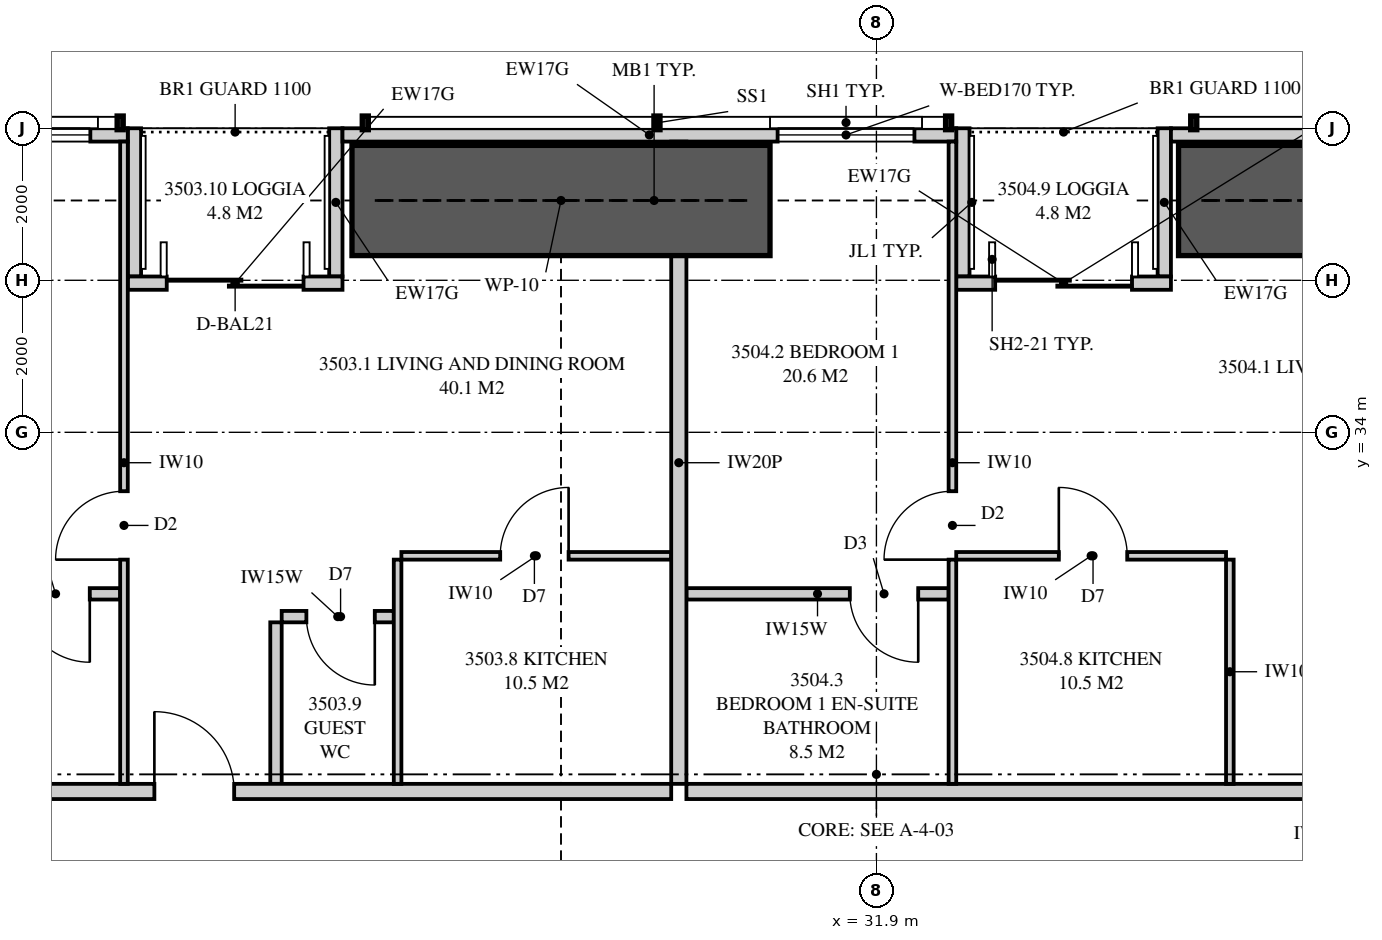
"""IFC4 building model, lengths in metres.
Left out: names, types, materials, properties, quantities, classifications, styles, units other than length and angle.
Written with IfcOpenShell. Run it as: python <this file> out.ifc"""

import sys

from ifc_helpers import new_model, si_unit, direction, frame, frame_2d, origin, place, context, subcontext, project, spatial, polyline, rectangle, outline, extrude, element, fill, save


model = new_model("IFC4")
c1 = context("Model", 3, precision=1e-05, world=origin(), true_north=direction((0.0, 1.0)))
c2 = subcontext(c1, "Body", "Model", "MODEL_VIEW")
j1 = project(units=[si_unit("LENGTHUNIT", "METRE"), si_unit("PLANEANGLEUNIT", "RADIAN")], contexts=[c1])
p1 = place(None, origin())
s1 = spatial("IfcSite", under=j1, at=p1, CompositionType="ELEMENT")
p2 = place(p1, origin())
s2 = spatial("IfcBuilding", under=s1, at=p2, CompositionType="ELEMENT")
p3 = place(p2, frame((0.0, 0.0, 128.3)))
s3 = spatial("IfcBuildingStorey", under=s2, at=p3, CompositionType="ELEMENT", Elevation=128.3)
p4 = place(p3, frame((46.449, 37.913, 0.0), z_axis=(0.0, 0.0, 1.0), x_axis=(-1.0, 0.0, 0.0)))
e1 = element("IfcWall", 1, at=p4, inside=s3, PredefinedType="SOLIDWALL", context=c2, shape_type="SweptSolid", body=[
    extrude(outline(polyline([(0.0, 0.0), (10.674, 0.0), (10.674, 2.15), (7.824, 2.15), (7.824, 3.11), (7.666, 3.11), (7.666, 2.15), (7.62, 2.15), (7.62, 3.11), (0.0, 3.11), (0.0, 0.0)])), frame((0.0, 0.087, 0.0), z_axis=(0.0, -1.0, 0.0), x_axis=(1.0, 0.0, 0.0)), (0.0, 0.0, 1.0), 0.175),
])
p5 = place(p4, frame((2.399, 0.0, 0.4)))
e2 = element("IfcOpeningElement", 2, at=p5, cuts=e1, PredefinedType="OPENING", context=c2, shape_type="SweptSolid", body=[
    extrude(rectangle(XDim=1.8, YDim=1.7, at=frame_2d((0.9, 0.85))), frame((0.0, 0.097, 0.0), z_axis=(0.0, -1.0, 0.0), x_axis=(1.0, 0.0, 0.0)), (0.0, 0.0, 1.0), 0.195),
])
p6 = place(p3, frame((32.95, 37.913, 0.0), z_axis=(0.0, 0.0, 1.0), x_axis=(-1.0, 0.0, 0.0)))
e3 = element("IfcWall", 3, at=p6, inside=s3, PredefinedType="SOLIDWALL", context=c2, shape_type="SweptSolid", body=[
    extrude(rectangle(XDim=8.075, YDim=0.175, at=frame_2d((4.038, 0.0))), origin(), (0.0, 0.0, 1.0), 2.15),
])
p7 = place(p6, frame((0.55, 0.0, 0.4)))
e4 = element("IfcOpeningElement", 4, at=p7, cuts=e3, PredefinedType="OPENING", context=c2, shape_type="SweptSolid", body=[
    extrude(rectangle(XDim=1.8, YDim=1.7, at=frame_2d((0.9, 0.85))), frame((0.0, 0.097, 0.0), z_axis=(0.0, -1.0, 0.0), x_axis=(1.0, 0.0, 0.0)), (0.0, 0.0, 1.0), 0.195),
])
p8 = place(p3, frame((22.05, 37.913, 0.0), z_axis=(0.0, 0.0, 1.0), x_axis=(-1.0, 0.0, 0.0)))
e5 = element("IfcWall", 5, at=p8, inside=s3, PredefinedType="SOLIDWALL", context=c2, shape_type="SweptSolid", body=[
    extrude(outline(polyline([(0.0, 0.0), (12.999, 0.0), (12.999, 3.11), (5.378, 3.11), (5.378, 2.15), (5.333, 2.15), (5.333, 3.11), (5.175, 3.11), (5.175, 2.15), (0.0, 2.15), (0.0, 0.0)])), frame((0.0, 0.087, 0.0), z_axis=(0.0, -1.0, 0.0), x_axis=(1.0, 0.0, 0.0)), (0.0, 0.0, 1.0), 0.175),
])
p9 = place(p8, frame((0.492, 0.0, 0.4)))
e6 = element("IfcOpeningElement", 6, at=p9, cuts=e5, PredefinedType="OPENING", context=c2, shape_type="SweptSolid", body=[
    extrude(rectangle(XDim=1.8, YDim=1.7, at=frame_2d((0.9, 0.85))), frame((0.0, 0.097, 0.0), z_axis=(0.0, -1.0, 0.0), x_axis=(1.0, 0.0, 0.0)), (0.0, 0.0, 1.0), 0.195),
])
p10 = place(p8, frame((8.065, 0.0, 0.4)))
e7 = element("IfcOpeningElement", 7, at=p10, cuts=e5, PredefinedType="OPENING", context=c2, shape_type="SweptSolid", body=[
    extrude(rectangle(XDim=1.8, YDim=1.7, at=frame_2d((0.9, 0.85))), frame((0.0, 0.097, 0.0), z_axis=(0.0, -1.0, 0.0), x_axis=(1.0, 0.0, 0.0)), (0.0, 0.0, 1.0), 0.195),
])
p11 = place(p3, frame((35.775, 35.962, 0.0), z_axis=(0.0, 0.0, 1.0), x_axis=(-1.0, 0.0, 0.0)))
e8 = element("IfcWall", 8, at=p11, inside=s3, PredefinedType="SOLIDWALL", context=c2, shape_type="SweptSolid", body=[
    extrude(rectangle(XDim=2.825, YDim=0.175, at=frame_2d((1.413, 0.0))), origin(), (0.0, 0.0, 1.0), 3.11),
])
p12 = place(p11, frame((0.512, 0.0, 0.0)))
e9 = element("IfcOpeningElement", 9, at=p12, cuts=e8, PredefinedType="OPENING", context=c2, shape_type="SweptSolid", body=[
    extrude(rectangle(XDim=1.8, YDim=2.1, at=frame_2d((0.9, 1.05))), frame((0.0, 0.097, 0.0), z_axis=(0.0, -1.0, 0.0), x_axis=(1.0, 0.0, 0.0)), (0.0, 0.0, 1.0), 0.195),
])
for number, where, z_axis, x_axis in (
    (10, (35.688, 38.0, 0.0), (0.0, 0.0, 1.0), (0.0, -1.0, 0.0)),
    (11, (33.038, 38.0, 0.0), (0.0, 0.0, 1.0), (0.0, -1.0, 0.0)),
):
    element("IfcWall", number, at=place(p3, frame(where, z_axis=z_axis, x_axis=x_axis)), inside=s3, PredefinedType="SOLIDWALL", context=c2, shape_type="SweptSolid", body=[
        extrude(outline(polyline([(0.0, 0.0), (1.95, 0.0), (1.95, 3.11), (1.75, 3.11), (1.75, 2.15), (0.15, 2.15), (0.15, 3.11), (0.0, 3.11), (0.0, 0.0)])), frame((0.0, 0.087, 0.0), z_axis=(0.0, -1.0, 0.0), x_axis=(1.0, 0.0, 0.0)), (0.0, 0.0, 1.0), 0.175),
    ])
p13 = place(p3, frame((24.875, 35.962, 0.0), z_axis=(0.0, 0.0, 1.0), x_axis=(-1.0, 0.0, 0.0)))
e12 = element("IfcWall", 12, at=p13, inside=s3, PredefinedType="SOLIDWALL", context=c2, shape_type="SweptSolid", body=[
    extrude(rectangle(XDim=2.825, YDim=0.175, at=frame_2d((1.413, 0.0))), origin(), (0.0, 0.0, 1.0), 3.11),
])
p14 = place(p13, frame((0.512, 0.0, 0.0)))
e13 = element("IfcOpeningElement", 13, at=p14, cuts=e12, PredefinedType="OPENING", context=c2, shape_type="SweptSolid", body=[
    extrude(rectangle(XDim=1.8, YDim=2.1, at=frame_2d((0.9, 1.05))), frame((0.0, 0.097, 0.0), z_axis=(0.0, -1.0, 0.0), x_axis=(1.0, 0.0, 0.0)), (0.0, 0.0, 1.0), 0.195),
])
for number, where, z_axis, x_axis in (
    (14, (24.788, 38.0, 0.0), (0.0, 0.0, 1.0), (0.0, -1.0, 0.0)),
    (15, (22.137, 38.0, 0.0), (0.0, 0.0, 1.0), (0.0, -1.0, 0.0)),
):
    element("IfcWall", number, at=place(p3, frame(where, z_axis=z_axis, x_axis=x_axis)), inside=s3, PredefinedType="SOLIDWALL", context=c2, shape_type="SweptSolid", body=[
        extrude(outline(polyline([(0.0, 0.0), (1.95, 0.0), (1.95, 3.11), (1.75, 3.11), (1.75, 2.15), (0.15, 2.15), (0.15, 3.11), (0.0, 3.11), (0.0, 0.0)])), frame((0.0, 0.087, 0.0), z_axis=(0.0, -1.0, 0.0), x_axis=(1.0, 0.0, 0.0)), (0.0, 0.0, 1.0), 0.175),
    ])
p15 = place(p3, frame((29.3, 37.825, 0.0), z_axis=(0.0, 0.0, 1.0), x_axis=(0.0, -1.0, 0.0)))
e16 = element("IfcWall", 16, at=p15, inside=s3, PredefinedType="PARTITIONING", context=c2, shape_type="SweptSolid", body=[
    extrude(outline(polyline([(0.529, 2.15), (0.0, 2.15), (0.0, 0.0), (0.529, 0.0), (0.529, 0.444), (1.021, 0.444), (1.021, 0.0), (8.45, 0.0), (8.45, 3.11), (1.685, 3.11), (1.685, 2.15), (1.021, 2.15), (1.021, 1.706), (0.529, 1.706), (0.529, 2.15)])), frame((0.0, 0.1, 0.0), z_axis=(0.0, -1.0, 0.0), x_axis=(1.0, 0.0, 0.0)), (0.0, 0.0, 1.0), 0.2),
])
p16 = place(p3, frame((17.775, 29.275, 0.0), z_axis=(0.0, 0.0, 1.0), x_axis=(1.0, 0.0, 0.0)))
e17 = element("IfcWall", 17, at=p16, inside=s3, PredefinedType="PARTITIONING", context=c2, shape_type="SweptSolid", body=[
    extrude(outline(polyline([(0.0, 0.0), (11.425, 0.0), (11.425, 3.11), (10.312, 3.11), (10.312, 2.541), (9.638, 2.541), (9.638, 3.11), (0.0, 3.11), (0.0, 0.0)])), frame((0.0, 0.1, 0.0), z_axis=(0.0, -1.0, 0.0), x_axis=(1.0, 0.0, 0.0)), (0.0, 0.0, 1.0), 0.2),
])
p17 = place(p16, frame((4.625, 0.0, 0.0)))
e18 = element("IfcOpeningElement", 18, at=p17, cuts=e17, PredefinedType="OPENING", context=c2, shape_type="SweptSolid", body=[
    extrude(rectangle(XDim=1.05, YDim=2.2, at=frame_2d((0.525, 1.1))), frame((0.0, 0.11, 0.0), z_axis=(0.0, -1.0, 0.0), x_axis=(1.0, 0.0, 0.0)), (0.0, 0.0, 1.0), 0.22),
])
p18 = place(p3, frame((22.0, 37.825, 0.0), z_axis=(0.0, 0.0, 1.0), x_axis=(0.0, -1.0, 0.0)))
e19 = element("IfcWall", 19, at=p18, inside=s3, PredefinedType="PARTITIONING", context=c2, shape_type="SweptSolid", body=[
    extrude(outline(polyline([(0.0, 0.0), (8.45, 0.0), (8.45, 3.11), (1.635, 3.11), (1.635, 2.15), (0.0, 2.15), (0.0, 3.11), (0.0, 0.0)])), frame((0.0, 0.05, 0.0), z_axis=(0.0, -1.0, 0.0), x_axis=(1.0, 0.0, 0.0)), (0.0, 0.0, 1.0), 0.1),
])
p19 = place(p18, frame((4.6, 0.0, 0.0)))
e20 = element("IfcOpeningElement", 20, at=p19, cuts=e19, PredefinedType="OPENING", context=c2, shape_type="SweptSolid", body=[
    extrude(rectangle(XDim=0.9, YDim=2.1, at=frame_2d((0.45, 1.05))), frame((0.0, 0.06, 0.0), z_axis=(0.0, -1.0, 0.0), x_axis=(1.0, 0.0, 0.0)), (0.0, 0.0, 1.0), 0.12),
])
p20 = place(p3, frame((17.75, 31.875, 0.0), z_axis=(0.0, 0.0, 1.0), x_axis=(1.0, 0.0, 0.0)))
e21 = element("IfcWall", 21, at=p20, inside=s3, PredefinedType="PLUMBINGWALL", context=c2, shape_type="SweptSolid", body=[
    extrude(rectangle(XDim=4.2, YDim=0.15, at=frame_2d((2.1, 0.0))), origin(), (0.0, 0.0, 1.0), 3.11),
])
p21 = place(p20, frame((2.9, 0.0, 0.0)))
e22 = element("IfcOpeningElement", 22, at=p21, cuts=e21, PredefinedType="OPENING", context=c2, shape_type="SweptSolid", body=[
    extrude(rectangle(XDim=0.9, YDim=2.1, at=frame_2d((0.45, 1.05))), frame((0.0, 0.085, 0.0), z_axis=(0.0, -1.0, 0.0), x_axis=(1.0, 0.0, 0.0)), (0.0, 0.0, 1.0), 0.17),
])
p22 = place(p3, frame((25.65, 32.375, 0.0), z_axis=(0.0, 0.0, 1.0), x_axis=(1.0, 0.0, 0.0)))
e23 = element("IfcWall", 23, at=p22, inside=s3, PredefinedType="PARTITIONING", context=c2, shape_type="SweptSolid", body=[
    extrude(outline(polyline([(0.0, 0.0), (3.55, 0.0), (3.55, 3.11), (2.387, 3.11), (2.387, 2.541), (1.812, 2.541), (1.812, 3.11), (0.0, 3.11), (0.0, 0.0)])), frame((0.0, 0.05, 0.0), z_axis=(0.0, -1.0, 0.0), x_axis=(1.0, 0.0, 0.0)), (0.0, 0.0, 1.0), 0.1),
])
p23 = place(p22, frame((1.3, 0.0, 0.0)))
e24 = element("IfcOpeningElement", 24, at=p23, cuts=e23, PredefinedType="OPENING", context=c2, shape_type="SweptSolid", body=[
    extrude(rectangle(XDim=0.9, YDim=2.1, at=frame_2d((0.45, 1.05))), frame((0.0, 0.06, 0.0), z_axis=(0.0, -1.0, 0.0), x_axis=(1.0, 0.0, 0.0)), (0.0, 0.0, 1.0), 0.12),
])
p24 = place(p3, frame((25.6, 32.325, 0.0), z_axis=(0.0, 0.0, 1.0), x_axis=(0.0, -1.0, 0.0)))
e25 = element("IfcWall", 25, at=p24, inside=s3, PredefinedType="PARTITIONING", context=c2, shape_type="SweptSolid", body=[
    extrude(rectangle(XDim=2.95, YDim=0.1, at=frame_2d((1.475, 0.0))), origin(), (0.0, 0.0, 1.0), 3.11),
])
p25 = place(p3, frame((24.075, 31.575, 0.0), z_axis=(0.0, 0.0, 1.0), x_axis=(1.0, 0.0, 0.0)))
e26 = element("IfcWall", 26, at=p25, inside=s3, PredefinedType="PLUMBINGWALL", context=c2, shape_type="SweptSolid", body=[
    extrude(rectangle(XDim=1.475, YDim=0.15, at=frame_2d((0.738, 0.0))), origin(), (0.0, 0.0, 1.0), 3.11),
])
p26 = place(p25, frame((0.325, 0.0, 0.0)))
e27 = element("IfcOpeningElement", 27, at=p26, cuts=e26, PredefinedType="OPENING", context=c2, shape_type="SweptSolid", body=[
    extrude(rectangle(XDim=0.9, YDim=2.1, at=frame_2d((0.45, 1.05))), frame((0.0, 0.085, 0.0), z_axis=(0.0, -1.0, 0.0), x_axis=(1.0, 0.0, 0.0)), (0.0, 0.0, 1.0), 0.17),
])
p27 = place(p3, frame((24.0, 31.5, 0.0), z_axis=(0.0, 0.0, 1.0), x_axis=(0.0, -1.0, 0.0)))
e28 = element("IfcWall", 28, at=p27, inside=s3, PredefinedType="PLUMBINGWALL", context=c2, shape_type="SweptSolid", body=[
    extrude(rectangle(XDim=2.125, YDim=0.15, at=frame_2d((1.062, 0.0))), origin(), (0.0, 0.0, 1.0), 3.11),
])
p28 = place(p3, frame((29.4, 29.275, 0.0), z_axis=(0.0, 0.0, 1.0), x_axis=(1.0, 0.0, 0.0)))
e29 = element("IfcWall", 29, at=p28, inside=s3, PredefinedType="PARTITIONING", context=c2, shape_type="SweptSolid", body=[
    extrude(rectangle(XDim=8.6, YDim=0.2, at=frame_2d((4.3, 0.0))), origin(), (0.0, 0.0, 1.0), 3.11),
])
p29 = place(p3, frame((32.9, 37.825, 0.0), z_axis=(0.0, 0.0, 1.0), x_axis=(0.0, -1.0, 0.0)))
e30 = element("IfcWall", 30, at=p29, inside=s3, PredefinedType="PARTITIONING", context=c2, shape_type="SweptSolid", body=[
    extrude(outline(polyline([(0.0, 0.0), (8.45, 0.0), (8.45, 3.11), (1.635, 3.11), (1.635, 2.15), (0.0, 2.15), (0.0, 3.11), (0.0, 0.0)])), frame((0.0, 0.05, 0.0), z_axis=(0.0, -1.0, 0.0), x_axis=(1.0, 0.0, 0.0)), (0.0, 0.0, 1.0), 0.1),
])
p30 = place(p29, frame((4.6, 0.0, 0.0)))
e31 = element("IfcOpeningElement", 31, at=p30, cuts=e30, PredefinedType="OPENING", context=c2, shape_type="SweptSolid", body=[
    extrude(rectangle(XDim=0.9, YDim=2.1, at=frame_2d((0.45, 1.05))), frame((0.0, 0.06, 0.0), z_axis=(0.0, -1.0, 0.0), x_axis=(1.0, 0.0, 0.0)), (0.0, 0.0, 1.0), 0.12),
])
p31 = place(p3, frame((29.4, 31.875, 0.0), z_axis=(0.0, 0.0, 1.0), x_axis=(1.0, 0.0, 0.0)))
e32 = element("IfcWall", 32, at=p31, inside=s3, PredefinedType="PLUMBINGWALL", context=c2, shape_type="SweptSolid", body=[
    extrude(rectangle(XDim=3.45, YDim=0.15, at=frame_2d((1.725, 0.0))), origin(), (0.0, 0.0, 1.0), 3.11),
])
p32 = place(p31, frame((2.15, 0.0, 0.0)))
e33 = element("IfcOpeningElement", 33, at=p32, cuts=e32, PredefinedType="OPENING", context=c2, shape_type="SweptSolid", body=[
    extrude(rectangle(XDim=0.9, YDim=2.1, at=frame_2d((0.45, 1.05))), frame((0.0, 0.085, 0.0), z_axis=(0.0, -1.0, 0.0), x_axis=(1.0, 0.0, 0.0)), (0.0, 0.0, 1.0), 0.17),
])
p33 = place(p3, frame((32.95, 32.375, 0.0), z_axis=(0.0, 0.0, 1.0), x_axis=(1.0, 0.0, 0.0)))
e34 = element("IfcWall", 34, at=p33, inside=s3, PredefinedType="PARTITIONING", context=c2, shape_type="SweptSolid", body=[
    extrude(rectangle(XDim=3.55, YDim=0.1, at=frame_2d((1.775, 0.0))), origin(), (0.0, 0.0, 1.0), 3.11),
])
p34 = place(p33, frame((1.35, 0.0, 0.0)))
e35 = element("IfcOpeningElement", 35, at=p34, cuts=e34, PredefinedType="OPENING", context=c2, shape_type="SweptSolid", body=[
    extrude(rectangle(XDim=0.9, YDim=2.1, at=frame_2d((0.45, 1.05))), frame((0.0, 0.06, 0.0), z_axis=(0.0, -1.0, 0.0), x_axis=(1.0, 0.0, 0.0)), (0.0, 0.0, 1.0), 0.12),
])
p35 = place(p3, frame((36.55, 32.325, 0.0), z_axis=(0.0, 0.0, 1.0), x_axis=(0.0, -1.0, 0.0)))
e36 = element("IfcWall", 36, at=p35, inside=s3, PredefinedType="PARTITIONING", context=c2, shape_type="SweptSolid", body=[
    extrude(rectangle(XDim=2.95, YDim=0.1, at=frame_2d((1.475, 0.0))), origin(), (0.0, 0.0, 1.0), 3.11),
])
for number, where, z_axis, x_axis in (
    (37, (35.875, 37.05, 0.0), (0.0, 0.0, 1.0), (1.0, 0.0, 0.0)),
    (38, (25.0, 37.05, 0.0), (0.0, 0.0, 1.0), (1.0, 0.0, 0.0)),
):
    element("IfcWall", number, at=place(p3, frame(where, z_axis=z_axis, x_axis=x_axis)), inside=s3, PredefinedType="SHEAR", context=c2, shape_type="SweptSolid", body=[
        extrude(rectangle(XDim=5.5, YDim=1.45, at=frame_2d((2.75, 0.0))), origin(), (0.0, 0.0, 1.0), 3.35),
    ])
p36 = place(p12, origin())
e39 = element("IfcDoor", 39, at=p36, inside=s3, OperationType="SLIDING_TO_LEFT", PredefinedType="DOOR", context=c2, shape_type="SweptSolid", body=[
    extrude(rectangle(XDim=1.8, YDim=2.1, at=frame_2d((0.9, 1.05))), frame((0.0, 0.025, 0.0), z_axis=(0.0, -1.0, 0.0), x_axis=(1.0, 0.0, 0.0)), (0.0, 0.0, 1.0), 0.05),
])
fill(e9, e39)
p37 = place(p7, origin())
e40 = element("IfcWindow", 40, at=p37, inside=s3, PartitioningType="SINGLE_PANEL", PredefinedType="WINDOW", context=c2, shape_type="SweptSolid", body=[
    extrude(rectangle(XDim=1.8, YDim=1.7, at=frame_2d((0.9, 0.85))), frame((0.0, 0.03, 0.0), z_axis=(0.0, -1.0, 0.0), x_axis=(1.0, 0.0, 0.0)), (0.0, 0.0, 1.0), 0.06),
])
fill(e4, e40)
p38 = place(p14, origin())
e41 = element("IfcDoor", 41, at=p38, inside=s3, OperationType="SLIDING_TO_LEFT", PredefinedType="DOOR", context=c2, shape_type="SweptSolid", body=[
    extrude(rectangle(XDim=1.8, YDim=2.1, at=frame_2d((0.9, 1.05))), frame((0.0, 0.025, 0.0), z_axis=(0.0, -1.0, 0.0), x_axis=(1.0, 0.0, 0.0)), (0.0, 0.0, 1.0), 0.05),
])
fill(e13, e41)
p39 = place(p9, origin())
e42 = element("IfcWindow", 42, at=p39, inside=s3, PartitioningType="SINGLE_PANEL", PredefinedType="WINDOW", context=c2, shape_type="SweptSolid", body=[
    extrude(rectangle(XDim=1.8, YDim=1.7, at=frame_2d((0.9, 0.85))), frame((0.0, 0.03, 0.0), z_axis=(0.0, -1.0, 0.0), x_axis=(1.0, 0.0, 0.0)), (0.0, 0.0, 1.0), 0.06),
])
fill(e6, e42)
p40 = place(p17, origin())
e43 = element("IfcDoor", 43, at=p40, inside=s3, OperationType="SINGLE_SWING_LEFT", PredefinedType="DOOR", context=c2, shape_type="SweptSolid", body=[
    extrude(rectangle(XDim=1.05, YDim=2.2, at=frame_2d((0.525, 1.1))), frame((0.0, 0.025, 0.0), z_axis=(0.0, -1.0, 0.0), x_axis=(1.0, 0.0, 0.0)), (0.0, 0.0, 1.0), 0.05),
])
fill(e18, e43)
p41 = place(p19, frame((0.9, 0.0, 0.0), z_axis=(0.0, 0.0, 1.0), x_axis=(-1.0, 0.0, 0.0)))
e44 = element("IfcDoor", 44, at=p41, inside=s3, OperationType="SINGLE_SWING_LEFT", PredefinedType="DOOR", context=c2, shape_type="SweptSolid", body=[
    extrude(rectangle(XDim=0.9, YDim=2.1, at=frame_2d((0.45, 1.05))), frame((0.0, 0.025, 0.0), z_axis=(0.0, -1.0, 0.0), x_axis=(1.0, 0.0, 0.0)), (0.0, 0.0, 1.0), 0.05),
])
fill(e20, e44)
p42 = place(p21, frame((0.9, 0.0, 0.0), z_axis=(0.0, 0.0, 1.0), x_axis=(-1.0, 0.0, 0.0)))
e45 = element("IfcDoor", 45, at=p42, inside=s3, OperationType="SINGLE_SWING_LEFT", PredefinedType="DOOR", context=c2, shape_type="SweptSolid", body=[
    extrude(rectangle(XDim=0.9, YDim=2.1, at=frame_2d((0.45, 1.05))), frame((0.0, 0.025, 0.0), z_axis=(0.0, -1.0, 0.0), x_axis=(1.0, 0.0, 0.0)), (0.0, 0.0, 1.0), 0.05),
])
fill(e22, e45)
p43 = place(p23, origin())
e46 = element("IfcDoor", 46, at=p43, inside=s3, OperationType="SINGLE_SWING_RIGHT", PredefinedType="DOOR", context=c2, shape_type="SweptSolid", body=[
    extrude(rectangle(XDim=0.9, YDim=2.1, at=frame_2d((0.45, 1.05))), frame((0.0, 0.025, 0.0), z_axis=(0.0, -1.0, 0.0), x_axis=(1.0, 0.0, 0.0)), (0.0, 0.0, 1.0), 0.05),
])
fill(e24, e46)
p44 = place(p26, frame((0.9, 0.0, 0.0), z_axis=(0.0, 0.0, 1.0), x_axis=(-1.0, 0.0, 0.0)))
e47 = element("IfcDoor", 47, at=p44, inside=s3, OperationType="SINGLE_SWING_LEFT", PredefinedType="DOOR", context=c2, shape_type="SweptSolid", body=[
    extrude(rectangle(XDim=0.9, YDim=2.1, at=frame_2d((0.45, 1.05))), frame((0.0, 0.025, 0.0), z_axis=(0.0, -1.0, 0.0), x_axis=(1.0, 0.0, 0.0)), (0.0, 0.0, 1.0), 0.05),
])
fill(e27, e47)
p45 = place(p30, frame((0.9, 0.0, 0.0), z_axis=(0.0, 0.0, 1.0), x_axis=(-1.0, 0.0, 0.0)))
e48 = element("IfcDoor", 48, at=p45, inside=s3, OperationType="SINGLE_SWING_LEFT", PredefinedType="DOOR", context=c2, shape_type="SweptSolid", body=[
    extrude(rectangle(XDim=0.9, YDim=2.1, at=frame_2d((0.45, 1.05))), frame((0.0, 0.025, 0.0), z_axis=(0.0, -1.0, 0.0), x_axis=(1.0, 0.0, 0.0)), (0.0, 0.0, 1.0), 0.05),
])
fill(e31, e48)
p46 = place(p32, frame((0.9, 0.0, 0.0), z_axis=(0.0, 0.0, 1.0), x_axis=(-1.0, 0.0, 0.0)))
e49 = element("IfcDoor", 49, at=p46, inside=s3, OperationType="SINGLE_SWING_LEFT", PredefinedType="DOOR", context=c2, shape_type="SweptSolid", body=[
    extrude(rectangle(XDim=0.9, YDim=2.1, at=frame_2d((0.45, 1.05))), frame((0.0, 0.025, 0.0), z_axis=(0.0, -1.0, 0.0), x_axis=(1.0, 0.0, 0.0)), (0.0, 0.0, 1.0), 0.05),
])
fill(e33, e49)
p47 = place(p34, origin())
e50 = element("IfcDoor", 50, at=p47, inside=s3, OperationType="SINGLE_SWING_LEFT", PredefinedType="DOOR", context=c2, shape_type="SweptSolid", body=[
    extrude(rectangle(XDim=0.9, YDim=2.1, at=frame_2d((0.45, 1.05))), frame((0.0, 0.025, 0.0), z_axis=(0.0, -1.0, 0.0), x_axis=(1.0, 0.0, 0.0)), (0.0, 0.0, 1.0), 0.05),
])
fill(e35, e50)
save(model, sys.argv[1])
